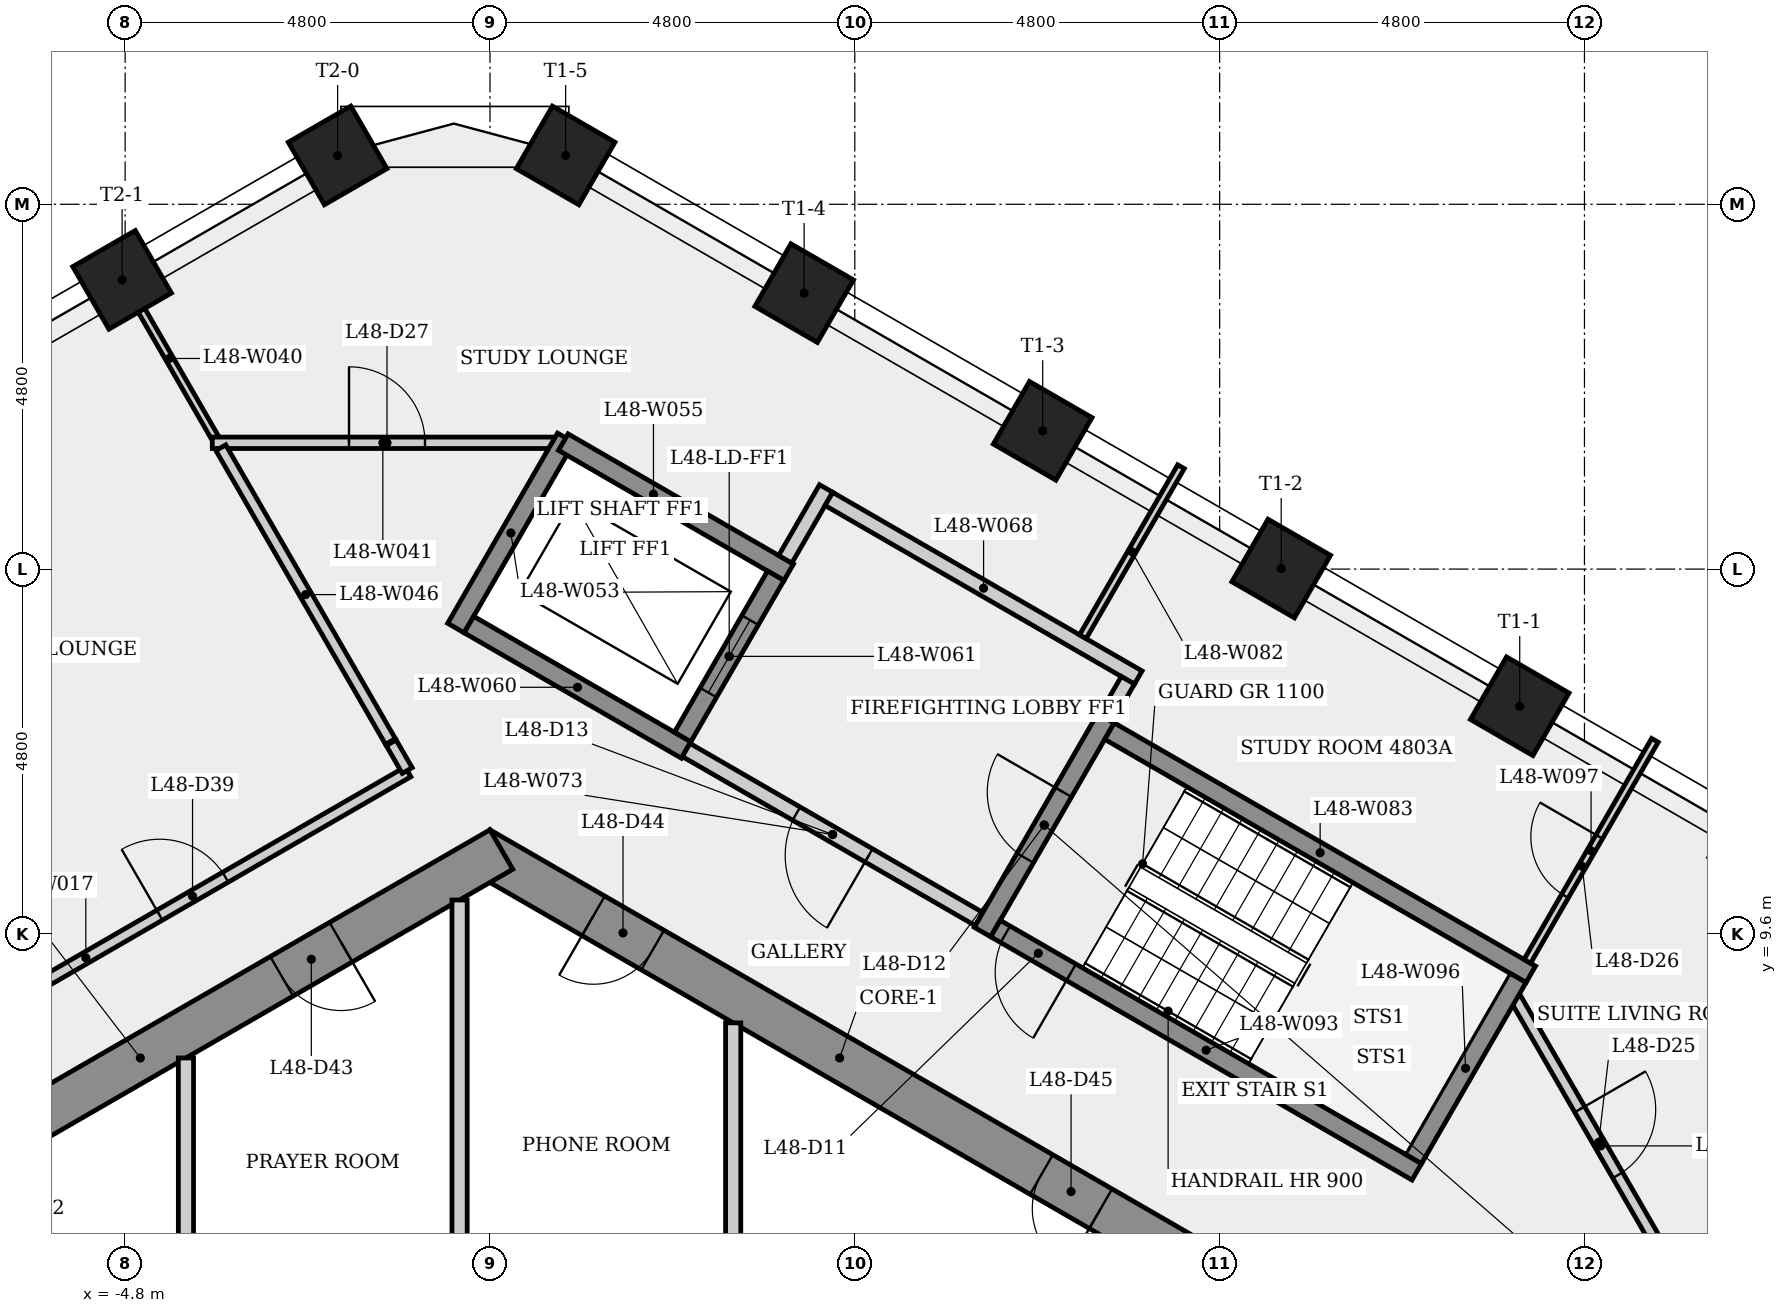
"""IFC4 building model, lengths in metres.
Left out: names, types, materials, properties, quantities, classifications, styles, units other than length and angle.
Written with IfcOpenShell. Run it as: python <this file> out.ifc"""

import sys

from ifc_helpers import new_model, si_unit, direction, frame, frame_2d, origin, origin_2d, place, context, subcontext, project, spatial, rectangle, extrude, element, fill, save


model = new_model("IFC4")
c1 = context("Model", 3, precision=1e-05, world=origin(), true_north=direction((0.0, 1.0)))
c2 = subcontext(c1, "Body", "Model", "MODEL_VIEW")
j1 = project(units=[si_unit("LENGTHUNIT", "METRE"), si_unit("PLANEANGLEUNIT", "RADIAN")], contexts=[c1])
p1 = place(None, origin())
s1 = spatial("IfcSite", under=j1, at=p1, CompositionType="ELEMENT")
p2 = place(p1, origin())
s2 = spatial("IfcBuilding", under=s1, at=p2, CompositionType="ELEMENT")
p3 = place(p2, frame((0.0, 0.0, 179.9)))
s3 = spatial("IfcBuildingStorey", under=s2, at=p3, CompositionType="ELEMENT", Elevation=179.9)
p4 = place(p3, frame((9.35, 5.225, 0.0), z_axis=(0.0, 0.0, 1.0), x_axis=(-0.866023993627, 0.500002442456, 0.0)))
e1 = element("IfcWall", 1, at=p4, inside=s3, PredefinedType="SHEAR", context=c2, shape_type="SweptSolid", body=[
    extrude(rectangle(XDim=10.97, YDim=0.6, at=frame_2d((5.485, 0.0))), origin(), (0.0, 0.0, 1.0), 3.4),
])
p5 = place(p4, frame((8.325, 0.0, 0.0)))
e2 = element("IfcOpeningElement", 2, at=p5, cuts=e1, PredefinedType="OPENING", context=c2, shape_type="SweptSolid", body=[
    extrude(rectangle(XDim=0.9, YDim=2.1, at=frame_2d((0.45, 1.05))), frame((0.0, 0.31, 0.0), z_axis=(0.0, -1.0, 0.0), x_axis=(1.0, 0.0, 0.0)), (0.0, 0.0, 1.0), 0.62),
])
p6 = place(p4, frame((1.518, 0.0, 0.0)))
e3 = element("IfcOpeningElement", 3, at=p6, cuts=e1, PredefinedType="OPENING", context=c2, shape_type="SweptSolid", body=[
    extrude(rectangle(XDim=0.9, YDim=2.1, at=frame_2d((0.45, 1.05))), frame((0.0, 0.31, 0.0), z_axis=(0.0, -1.0, 0.0), x_axis=(1.0, 0.0, 0.0)), (0.0, 0.0, 1.0), 0.62),
])
p7 = place(p3, frame((0.15, 10.71, 0.0), z_axis=(0.0, 0.0, 1.0), x_axis=(-0.866023993627, -0.500002442456, 0.0)))
e4 = element("IfcWall", 4, at=p7, inside=s3, PredefinedType="SHEAR", context=c2, shape_type="SweptSolid", body=[
    extrude(rectangle(XDim=10.97, YDim=0.6, at=frame_2d((5.485, 0.0))), origin(), (0.0, 0.0, 1.0), 3.4),
])
p8 = place(p7, frame((9.013, 0.0, 0.0)))
e5 = element("IfcOpeningElement", 5, at=p8, cuts=e4, PredefinedType="OPENING", context=c2, shape_type="SweptSolid", body=[
    extrude(rectangle(XDim=0.9, YDim=2.1, at=frame_2d((0.45, 1.05))), frame((0.0, 0.31, 0.0), z_axis=(0.0, -1.0, 0.0), x_axis=(1.0, 0.0, 0.0)), (0.0, 0.0, 1.0), 0.62),
])
p9 = place(p7, frame((2.437, 0.0, 0.0)))
e6 = element("IfcOpeningElement", 6, at=p9, cuts=e4, PredefinedType="OPENING", context=c2, shape_type="SweptSolid", body=[
    extrude(rectangle(XDim=0.9, YDim=2.1, at=frame_2d((0.45, 1.05))), frame((0.0, 0.31, 0.0), z_axis=(0.0, -1.0, 0.0), x_axis=(1.0, 0.0, 0.0)), (0.0, 0.0, 1.0), 0.62),
])
for number, where, z_axis, x_axis in (
    (7, (13.548, 12.595, 0.0), (0.0, 0.0, 1.0), (0.5, 0.866, 0.0)),
    (8, (10.41, 14.407, 0.0), (0.0, 0.0, 1.0), (0.5, 0.866, 0.0)),
    (9, (7.272, 16.219, 0.0), (0.0, 0.0, 1.0), (0.5, 0.866, 0.0)),
    (10, (4.134, 18.031, 0.0), (0.0, 0.0, 1.0), (0.5, 0.866, 0.0)),
    (11, (0.996, 19.843, 0.0), (0.0, 0.0, 1.0), (0.5, 0.866, 0.0)),
    (12, (-2.004, 19.843, 0.0), (0.0, 0.0, 1.0), (-0.5, 0.866, 0.0)),
    (13, (-4.84, 18.206, 0.0), (0.0, 0.0, 1.0), (-0.5, 0.866, 0.0)),
):
    element("IfcColumn", number, at=place(p3, frame(where, z_axis=z_axis, x_axis=x_axis)), inside=s3, PredefinedType="COLUMN", context=c2, shape_type="SweptSolid", body=[
        extrude(rectangle(XDim=0.95, YDim=0.95, at=origin_2d()), origin(), (0.0, 0.0, 1.0), 3.4),
    ])
p10 = place(p3, frame((-9.556, 6.838, 0.0), z_axis=(0.0, 0.0, 1.0), x_axis=(0.866029004385, 0.499993763526, 0.0)))
e14 = element("IfcWall", 14, at=p10, inside=s3, PredefinedType="PARTITIONING", context=c2, shape_type="SweptSolid", body=[
    extrude(rectangle(XDim=9.789, YDim=0.15, at=frame_2d((4.895, 0.0))), origin(), (0.0, 0.0, 1.0), 3.05),
])
p11 = place(p10, frame((6.016, 0.0, 0.0)))
e15 = element("IfcOpeningElement", 15, at=p11, cuts=e14, PredefinedType="OPENING", context=c2, shape_type="SweptSolid", body=[
    extrude(rectangle(XDim=1.0, YDim=2.1, at=frame_2d((0.5, 1.05))), frame((0.0, 0.085, 0.0), z_axis=(0.0, -1.0, 0.0), x_axis=(1.0, 0.0, 0.0)), (0.0, 0.0, 1.0), 0.17),
])
p12 = place(p3, frame((-4.0, 7.967, 0.0), z_axis=(0.0, 0.0, 1.0), x_axis=(0.0, -1.0, 0.0)))
e16 = element("IfcWall", 16, at=p12, inside=s3, PredefinedType="PARTITIONING", context=c2, shape_type="SweptSolid", body=[
    extrude(rectangle(XDim=2.692, YDim=0.2, at=frame_2d((1.346, 0.0))), origin(), (0.0, 0.0, 1.0), 3.05),
])
p13 = place(p3, frame((-3.616, 16.127, 0.0), z_axis=(0.0, 0.0, 1.0), x_axis=(-0.500046584259, 0.865998506679, 0.0)))
e17 = element("IfcWall", 17, at=p13, inside=s3, PredefinedType="PARTITIONING", context=c2, shape_type="SweptSolid", body=[
    extrude(rectangle(XDim=2.412, YDim=0.1, at=frame_2d((1.206, 0.0))), origin(), (0.0, 0.0, 1.0), 3.05),
])
p14 = place(p3, frame((-3.654, 16.062, 0.0), z_axis=(0.0, 0.0, 1.0), x_axis=(1.0, 0.0, 0.0)))
e18 = element("IfcWall", 18, at=p14, inside=s3, PredefinedType="PARTITIONING", context=c2, shape_type="SweptSolid", body=[
    extrude(rectangle(XDim=4.488, YDim=0.15, at=frame_2d((2.244, 0.0))), origin(), (0.0, 0.0, 1.0), 3.05),
])
p15 = place(p14, frame((1.799, 0.0, 0.0)))
e19 = element("IfcOpeningElement", 19, at=p15, cuts=e18, PredefinedType="OPENING", context=c2, shape_type="SweptSolid", body=[
    extrude(rectangle(XDim=1.0, YDim=2.1, at=frame_2d((0.5, 1.05))), frame((0.0, 0.085, 0.0), z_axis=(0.0, -1.0, 0.0), x_axis=(1.0, 0.0, 0.0)), (0.0, 0.0, 1.0), 0.17),
])
p16 = place(p3, frame((-1.31, 12.132, 0.0), z_axis=(0.0, 0.0, 1.0), x_axis=(-0.499998682516, 0.866026164433, 0.0)))
e20 = element("IfcWall", 20, at=p16, inside=s3, PredefinedType="PARTITIONING", context=c2, shape_type="SweptSolid", body=[
    extrude(rectangle(XDim=4.463, YDim=0.15, at=frame_2d((2.231, 0.0))), origin(), (0.0, 0.0, 1.0), 3.05),
])
p17 = place(p3, frame((-1.3, 12.115, 0.0), z_axis=(0.0, 0.0, 1.0), x_axis=(0.500190688257, -0.865915281873, 0.0)))
e21 = element("IfcWall", 21, at=p17, inside=s3, PredefinedType="PARTITIONING", context=c2, shape_type="SweptSolid", body=[
    extrude(rectangle(XDim=0.421, YDim=0.15, at=frame_2d((0.21, 0.0))), origin(), (0.0, 0.0, 1.0), 3.05),
])
p18 = place(p3, frame((-0.4, 10.046, 0.0), z_axis=(0.0, 0.0, 1.0), x_axis=(0.0, -1.0, 0.0)))
e22 = element("IfcWall", 22, at=p18, inside=s3, PredefinedType="PARTITIONING", context=c2, shape_type="SweptSolid", body=[
    extrude(rectangle(XDim=4.771, YDim=0.2, at=frame_2d((2.385, 0.0))), origin(), (0.0, 0.0, 1.0), 3.05),
])
p19 = place(p3, frame((-0.448, 13.624, 0.0), z_axis=(0.0, 0.0, 1.0), x_axis=(0.500073484721, 0.865982973204, 0.0)))
e23 = element("IfcWall", 23, at=p19, inside=s3, PredefinedType="SHEAR", context=c2, shape_type="SweptSolid", body=[
    extrude(rectangle(XDim=2.89, YDim=0.25, at=frame_2d((1.445, 0.0))), origin(), (0.0, 0.0, 1.0), 3.05),
])
p20 = place(p3, frame((0.965, 16.071, 0.0), z_axis=(0.0, 0.0, 1.0), x_axis=(0.866050272892, -0.499956922968, 0.0)))
e24 = element("IfcWall", 24, at=p20, inside=s3, PredefinedType="SHEAR", context=c2, shape_type="SweptSolid", body=[
    extrude(rectangle(XDim=3.425, YDim=0.25, at=frame_2d((1.712, 0.0))), origin(), (0.0, 0.0, 1.0), 3.05),
])
p21 = place(p3, frame((2.581, 12.02, 0.0), z_axis=(0.0, 0.0, 1.0), x_axis=(-0.866040211805, 0.499974350878, 0.0)))
e25 = element("IfcWall", 25, at=p21, inside=s3, PredefinedType="SHEAR", context=c2, shape_type="SweptSolid", body=[
    extrude(rectangle(XDim=3.3, YDim=0.25, at=frame_2d((1.65, 0.0))), origin(), (0.0, 0.0, 1.0), 3.05),
])
p22 = place(p3, frame((2.535, 12.191, 0.0), z_axis=(0.0, 0.0, 1.0), x_axis=(0.500061746146, 0.865989751695, 0.0)))
e26 = element("IfcWall", 26, at=p22, inside=s3, PredefinedType="SHEAR", context=c2, shape_type="SweptSolid", body=[
    extrude(rectangle(XDim=2.45, YDim=0.25, at=frame_2d((1.225, 0.0))), origin(), (0.0, 0.0, 1.0), 3.4),
])
p23 = place(p22, frame((0.675, 0.0, 0.0)))
e27 = element("IfcOpeningElement", 27, at=p23, cuts=e26, PredefinedType="OPENING", context=c2, shape_type="SweptSolid", body=[
    extrude(rectangle(XDim=1.1, YDim=2.1, at=frame_2d((0.55, 1.05))), frame((0.0, 0.135, 0.0), z_axis=(0.0, -1.0, 0.0), x_axis=(1.0, 0.0, 0.0)), (0.0, 0.0, 1.0), 0.27),
])
p24 = place(p3, frame((3.2, 8.429, 0.0), z_axis=(0.0, 0.0, 1.0), x_axis=(0.0, -1.0, 0.0)))
e28 = element("IfcWall", 28, at=p24, inside=s3, PredefinedType="PARTITIONING", context=c2, shape_type="SweptSolid", body=[
    extrude(rectangle(XDim=3.154, YDim=0.2, at=frame_2d((1.577, 0.0))), origin(), (0.0, 0.0, 1.0), 3.05),
])
p25 = place(p3, frame((3.885, 14.529, 0.0), z_axis=(0.0, 0.0, 1.0), x_axis=(0.499997628298, 0.866026773083, 0.0)))
e29 = element("IfcWall", 29, at=p25, inside=s3, PredefinedType="PARTITIONING", context=c2, shape_type="SweptSolid", body=[
    extrude(rectangle(XDim=1.075, YDim=0.2, at=frame_2d((0.538, 0.0))), origin(), (0.0, 0.0, 1.0), 3.05),
])
p26 = place(p3, frame((4.459, 15.323, 0.0), z_axis=(0.0, 0.0, 1.0), x_axis=(0.866016039709, -0.500016218704, 0.0)))
e30 = element("IfcWall", 30, at=p26, inside=s3, PredefinedType="PARTITIONING", context=c2, shape_type="SweptSolid", body=[
    extrude(rectangle(XDim=4.7, YDim=0.2, at=frame_2d((2.35, 0.0))), origin(), (0.0, 0.0, 1.0), 3.05),
])
p27 = place(p3, frame((6.435, 9.795, 0.0), z_axis=(0.0, 0.0, 1.0), x_axis=(-0.866012907634, 0.500021643343, 0.0)))
e31 = element("IfcWall", 31, at=p27, inside=s3, PredefinedType="PARTITIONING", context=c2, shape_type="SweptSolid", body=[
    extrude(rectangle(XDim=4.45, YDim=0.2, at=frame_2d((2.225, 0.0))), origin(), (0.0, 0.0, 1.0), 3.05),
])
p28 = place(p27, frame((1.675, 0.0, 0.0)))
e32 = element("IfcOpeningElement", 32, at=p28, cuts=e31, PredefinedType="OPENING", context=c2, shape_type="SweptSolid", body=[
    extrude(rectangle(XDim=1.1, YDim=2.1, at=frame_2d((0.55, 1.05))), frame((0.0, 0.11, 0.0), z_axis=(0.0, -1.0, 0.0), x_axis=(1.0, 0.0, 0.0)), (0.0, 0.0, 1.0), 0.22),
])
p29 = place(p3, frame((6.48, 9.624, 0.0), z_axis=(0.0, 0.0, 1.0), x_axis=(0.500017246033, 0.866015446554, 0.0)))
e33 = element("IfcWall", 33, at=p29, inside=s3, PredefinedType="SHEAR", context=c2, shape_type="SweptSolid", body=[
    extrude(rectangle(XDim=3.25, YDim=0.25, at=frame_2d((1.625, 0.0))), origin(), (0.0, 0.0, 1.0), 3.05),
])
p30 = place(p29, frame((1.125, 0.0, 0.0)))
e34 = element("IfcOpeningElement", 34, at=p30, cuts=e33, PredefinedType="OPENING", context=c2, shape_type="SweptSolid", body=[
    extrude(rectangle(XDim=1.0, YDim=2.1, at=frame_2d((0.5, 1.05))), frame((0.0, 0.135, 0.0), z_axis=(0.0, -1.0, 0.0), x_axis=(1.0, 0.0, 0.0)), (0.0, 0.0, 1.0), 0.27),
])
p31 = place(p3, frame((7.8, 13.51, 0.0), z_axis=(0.0, 0.0, 1.0), x_axis=(0.499992497538, 0.86602973529, 0.0)))
e35 = element("IfcWall", 35, at=p31, inside=s3, PredefinedType="PARTITIONING", context=c2, shape_type="SweptSolid", body=[
    extrude(rectangle(XDim=2.583, YDim=0.1, at=frame_2d((1.291, 0.0))), origin(), (0.0, 0.0, 1.0), 3.05),
])
p32 = place(p3, frame((8.151, 12.268, 0.0), z_axis=(0.0, 0.0, 1.0), x_axis=(0.866025499775, -0.499999833739, 0.0)))
e36 = element("IfcWall", 36, at=p32, inside=s3, PredefinedType="SHEAR", context=c2, shape_type="SweptSolid", body=[
    extrude(rectangle(XDim=6.4, YDim=0.25, at=frame_2d((3.2, 0.0))), origin(), (0.0, 0.0, 1.0), 3.05),
])
p33 = place(p3, frame((8.393, 12.937, 0.0), z_axis=(0.0, 0.0, 1.0), x_axis=(-0.500065409566, -0.86598763626, 0.0)))
e37 = element("IfcWall", 37, at=p33, inside=s3, PredefinedType="PARTITIONING", context=c2, shape_type="SweptSolid", body=[
    extrude(rectangle(XDim=0.575, YDim=0.2, at=frame_2d((0.288, 0.0))), origin(), (0.0, 0.0, 1.0), 3.05),
])
p34 = place(p3, frame((12.194, 6.47, 0.0), z_axis=(0.0, 0.0, 1.0), x_axis=(-0.866025499775, 0.499999833739, 0.0)))
e38 = element("IfcWall", 38, at=p34, inside=s3, PredefinedType="SHEAR", context=c2, shape_type="SweptSolid", body=[
    extrude(rectangle(XDim=6.4, YDim=0.25, at=frame_2d((3.2, 0.0))), origin(), (0.0, 0.0, 1.0), 3.05),
])
p35 = place(p34, frame((5.25, 0.0, 0.0)))
e39 = element("IfcOpeningElement", 39, at=p35, cuts=e38, PredefinedType="OPENING", context=c2, shape_type="SweptSolid", body=[
    extrude(rectangle(XDim=1.0, YDim=2.1, at=frame_2d((0.5, 1.05))), frame((0.0, 0.135, 0.0), z_axis=(0.0, -1.0, 0.0), x_axis=(1.0, 0.0, 0.0)), (0.0, 0.0, 1.0), 0.27),
])
p36 = place(p3, frame((13.493, 8.753, 0.0), z_axis=(0.0, 0.0, 1.0), x_axis=(0.500047370938, -0.865998052433, 0.0)))
e40 = element("IfcWall", 40, at=p36, inside=s3, PredefinedType="PARTITIONING", context=c2, shape_type="SweptSolid", body=[
    extrude(rectangle(XDim=4.488, YDim=0.15, at=frame_2d((2.244, 0.0))), origin(), (0.0, 0.0, 1.0), 3.05),
])
p37 = place(p36, frame((1.689, 0.0, 0.0)))
e41 = element("IfcOpeningElement", 41, at=p37, cuts=e40, PredefinedType="OPENING", context=c2, shape_type="SweptSolid", body=[
    extrude(rectangle(XDim=1.0, YDim=2.1, at=frame_2d((0.5, 1.05))), frame((0.0, 0.085, 0.0), z_axis=(0.0, -1.0, 0.0), x_axis=(1.0, 0.0, 0.0)), (0.0, 0.0, 1.0), 0.17),
])
p38 = place(p3, frame((12.148, 6.641, 0.0), z_axis=(0.0, 0.0, 1.0), x_axis=(0.500034990121, 0.866005201286, 0.0)))
e42 = element("IfcWall", 42, at=p38, inside=s3, PredefinedType="SHEAR", context=c2, shape_type="SweptSolid", body=[
    extrude(rectangle(XDim=2.75, YDim=0.25, at=frame_2d((1.375, 0.0))), origin(), (0.0, 0.0, 1.0), 3.05),
])
p39 = place(p3, frame((13.648, 9.239, 0.0), z_axis=(0.0, 0.0, 1.0), x_axis=(0.500064393924, 0.865988222743, 0.0)))
e43 = element("IfcWall", 43, at=p39, inside=s3, PredefinedType="PARTITIONING", context=c2, shape_type="SweptSolid", body=[
    extrude(rectangle(XDim=3.358, YDim=0.1, at=frame_2d((1.679, 0.0))), origin(), (0.0, 0.0, 1.0), 3.05),
])
p40 = place(p39, frame((0.993, 0.0, 0.0)))
e44 = element("IfcOpeningElement", 44, at=p40, cuts=e43, PredefinedType="OPENING", context=c2, shape_type="SweptSolid", body=[
    extrude(rectangle(XDim=0.9, YDim=2.1, at=frame_2d((0.45, 1.05))), frame((0.0, 0.06, 0.0), z_axis=(0.0, -1.0, 0.0), x_axis=(1.0, 0.0, 0.0)), (0.0, 0.0, 1.0), 0.12),
])
p41 = place(p35, origin())
e45 = element("IfcDoor", 45, at=p41, inside=s3, OperationType="SINGLE_SWING_LEFT", PredefinedType="DOOR", context=c2, shape_type="SweptSolid", body=[
    extrude(rectangle(XDim=1.0, YDim=2.1, at=frame_2d((0.5, 1.05))), frame((0.0, 0.025, 0.0), z_axis=(0.0, -1.0, 0.0), x_axis=(1.0, 0.0, 0.0)), (0.0, 0.0, 1.0), 0.05),
])
fill(e39, e45)
p42 = place(p30, origin())
e46 = element("IfcDoor", 46, at=p42, inside=s3, OperationType="SINGLE_SWING_RIGHT", PredefinedType="DOOR", context=c2, shape_type="SweptSolid", body=[
    extrude(rectangle(XDim=1.0, YDim=2.1, at=frame_2d((0.5, 1.05))), frame((0.0, 0.025, 0.0), z_axis=(0.0, -1.0, 0.0), x_axis=(1.0, 0.0, 0.0)), (0.0, 0.0, 1.0), 0.05),
])
fill(e34, e46)
p43 = place(p28, origin())
e47 = element("IfcDoor", 47, at=p43, inside=s3, OperationType="SINGLE_SWING_LEFT", PredefinedType="DOOR", context=c2, shape_type="SweptSolid", body=[
    extrude(rectangle(XDim=1.1, YDim=2.1, at=frame_2d((0.55, 1.05))), frame((0.0, 0.025, 0.0), z_axis=(0.0, -1.0, 0.0), x_axis=(1.0, 0.0, 0.0)), (0.0, 0.0, 1.0), 0.05),
])
fill(e32, e47)
p44 = place(p23, origin())
e48 = element("IfcDoor", 48, at=p44, inside=s3, OperationType="SLIDING_TO_LEFT", PredefinedType="DOOR", context=c2, shape_type="SweptSolid", body=[
    extrude(rectangle(XDim=1.1, YDim=2.1, at=frame_2d((0.55, 1.05))), frame((0.0, 0.025, 0.0), z_axis=(0.0, -1.0, 0.0), x_axis=(1.0, 0.0, 0.0)), (0.0, 0.0, 1.0), 0.05),
])
fill(e27, e48)
p45 = place(p37, origin())
e49 = element("IfcDoor", 49, at=p45, inside=s3, OperationType="SINGLE_SWING_LEFT", PredefinedType="DOOR", context=c2, shape_type="SweptSolid", body=[
    extrude(rectangle(XDim=1.0, YDim=2.1, at=frame_2d((0.5, 1.05))), frame((0.0, 0.025, 0.0), z_axis=(0.0, -1.0, 0.0), x_axis=(1.0, 0.0, 0.0)), (0.0, 0.0, 1.0), 0.05),
])
fill(e41, e49)
p46 = place(p40, origin())
e50 = element("IfcDoor", 50, at=p46, inside=s3, OperationType="SINGLE_SWING_RIGHT", PredefinedType="DOOR", context=c2, shape_type="SweptSolid", body=[
    extrude(rectangle(XDim=0.9, YDim=2.1, at=frame_2d((0.45, 1.05))), frame((0.0, 0.025, 0.0), z_axis=(0.0, -1.0, 0.0), x_axis=(1.0, 0.0, 0.0)), (0.0, 0.0, 1.0), 0.05),
])
fill(e44, e50)
p47 = place(p15, origin())
e51 = element("IfcDoor", 51, at=p47, inside=s3, OperationType="SINGLE_SWING_LEFT", PredefinedType="DOOR", context=c2, shape_type="SweptSolid", body=[
    extrude(rectangle(XDim=1.0, YDim=2.1, at=frame_2d((0.5, 1.05))), frame((0.0, 0.025, 0.0), z_axis=(0.0, -1.0, 0.0), x_axis=(1.0, 0.0, 0.0)), (0.0, 0.0, 1.0), 0.05),
])
fill(e19, e51)
p48 = place(p11, origin())
e52 = element("IfcDoor", 52, at=p48, inside=s3, OperationType="SINGLE_SWING_LEFT", PredefinedType="DOOR", context=c2, shape_type="SweptSolid", body=[
    extrude(rectangle(XDim=1.0, YDim=2.1, at=frame_2d((0.5, 1.05))), frame((0.0, 0.025, 0.0), z_axis=(0.0, -1.0, 0.0), x_axis=(1.0, 0.0, 0.0)), (0.0, 0.0, 1.0), 0.05),
])
fill(e15, e52)
p49 = place(p9, origin())
e53 = element("IfcDoor", 53, at=p49, inside=s3, OperationType="SINGLE_SWING_LEFT", PredefinedType="DOOR", context=c2, shape_type="SweptSolid", body=[
    extrude(rectangle(XDim=0.9, YDim=2.1, at=frame_2d((0.45, 1.05))), frame((0.0, 0.025, 0.0), z_axis=(0.0, -1.0, 0.0), x_axis=(1.0, 0.0, 0.0)), (0.0, 0.0, 1.0), 0.05),
])
fill(e6, e53)
p50 = place(p5, origin())
e54 = element("IfcDoor", 54, at=p50, inside=s3, OperationType="SINGLE_SWING_RIGHT", PredefinedType="DOOR", context=c2, shape_type="SweptSolid", body=[
    extrude(rectangle(XDim=0.9, YDim=2.1, at=frame_2d((0.45, 1.05))), frame((0.0, 0.025, 0.0), z_axis=(0.0, -1.0, 0.0), x_axis=(1.0, 0.0, 0.0)), (0.0, 0.0, 1.0), 0.05),
])
fill(e2, e54)
p51 = place(p6, origin())
e55 = element("IfcDoor", 55, at=p51, inside=s3, OperationType="SINGLE_SWING_LEFT", PredefinedType="DOOR", context=c2, shape_type="SweptSolid", body=[
    extrude(rectangle(XDim=0.9, YDim=2.1, at=frame_2d((0.45, 1.05))), frame((0.0, 0.025, 0.0), z_axis=(0.0, -1.0, 0.0), x_axis=(1.0, 0.0, 0.0)), (0.0, 0.0, 1.0), 0.05),
])
fill(e3, e55)
save(model, sys.argv[1])
